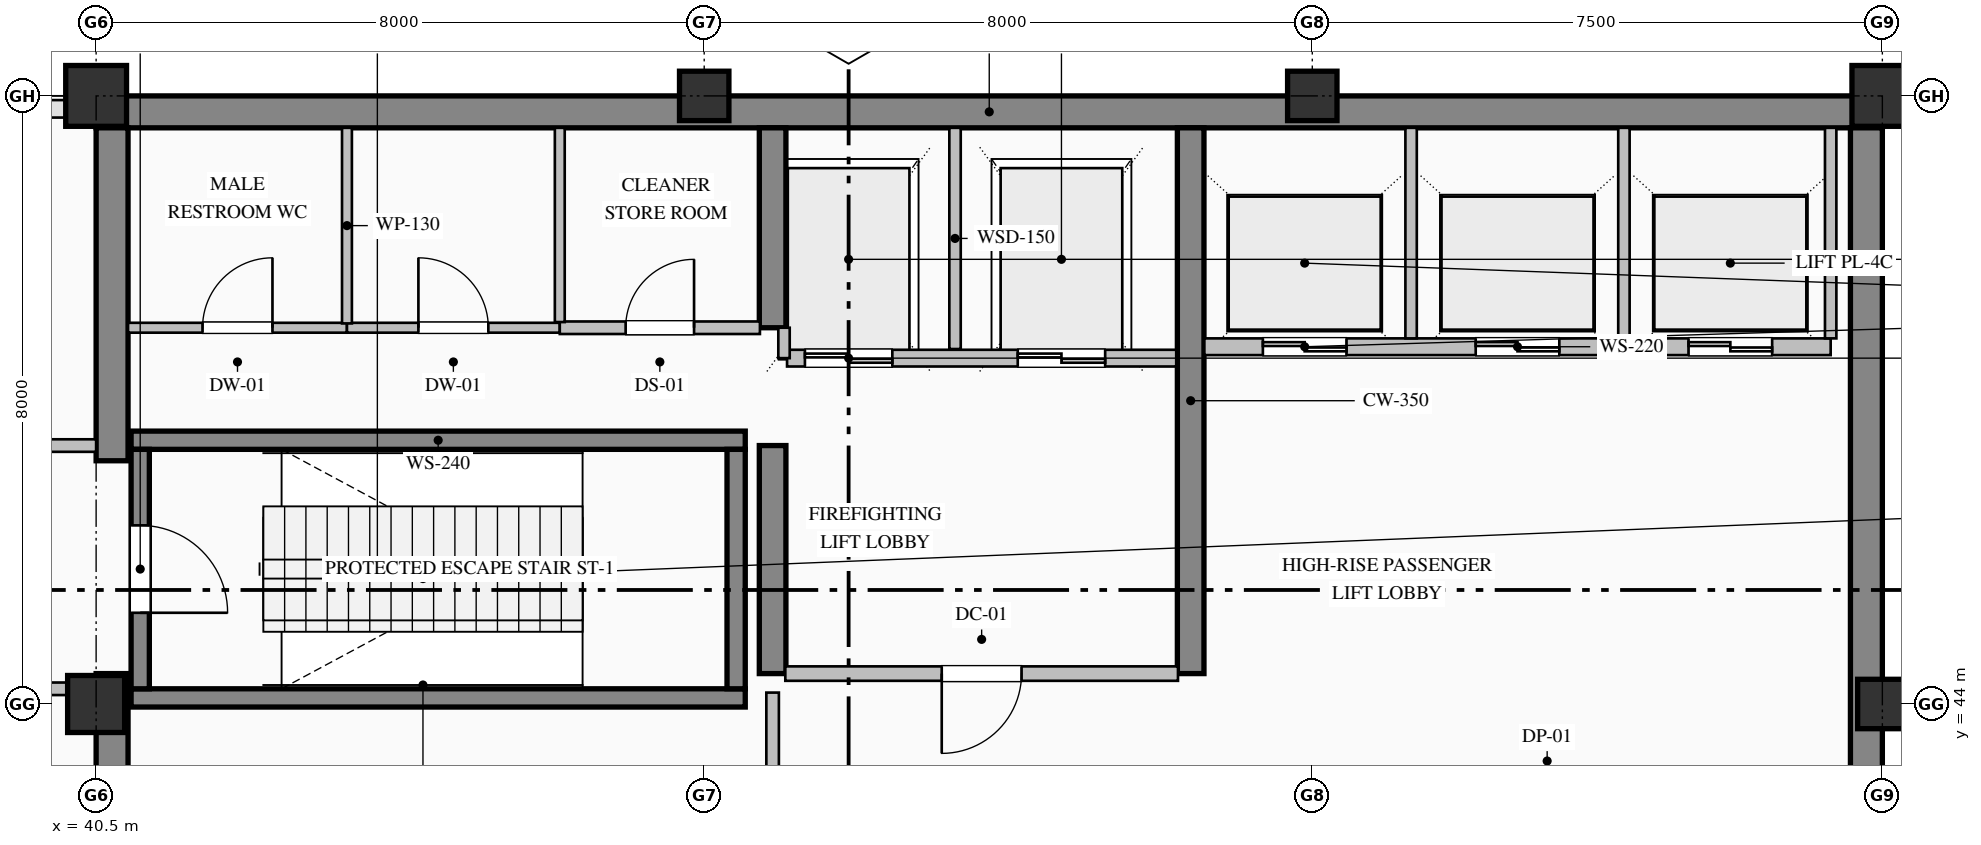
"""IFC4 building model, lengths in metres.
Left out: names, types, materials, properties, quantities, classifications, styles, units other than length and angle.
Written with IfcOpenShell. Run it as: python <this file> out.ifc"""

import sys

from ifc_helpers import new_model, si_unit, direction, frame, frame_2d, origin, origin_2d, place, context, subcontext, project, spatial, rectangle, hollow_rectangle, extrude, element, fill, save


model = new_model("IFC4")
c1 = context("Model", 3, precision=1e-05, world=origin(), true_north=direction((0.0, 1.0)))
c2 = subcontext(c1, "Body", "Model", "MODEL_VIEW")
j1 = project(units=[si_unit("LENGTHUNIT", "METRE"), si_unit("PLANEANGLEUNIT", "RADIAN")], contexts=[c1])
p1 = place(None, origin())
s1 = spatial("IfcSite", under=j1, at=p1, CompositionType="ELEMENT")
p2 = place(p1, origin())
s2 = spatial("IfcBuilding", under=s1, at=p2, CompositionType="ELEMENT")
p3 = place(p2, frame((0.0, 0.0, 367.2)))
s3 = spatial("IfcBuildingStorey", under=s2, at=p3, CompositionType="ELEMENT", Elevation=367.2)
p4 = place(p3, frame((40.5, 51.79, 0.0), z_axis=(0.0, 0.0, 1.0), x_axis=(1.0, 0.0, 0.0)))
e1 = element("IfcWall", 1, at=p4, inside=s3, PredefinedType="SHEAR", context=c2, shape_type="SweptSolid", body=[
    extrude(rectangle(XDim=23.5, YDim=0.42, at=frame_2d((11.75, 0.0))), origin(), (0.0, 0.0, 1.0), 5.39),
])
p5 = place(p3, frame((63.79, 36.32, 0.0), z_axis=(0.0, 0.0, 1.0), x_axis=(0.0, 1.0, 0.0)))
e2 = element("IfcWall", 2, at=p5, inside=s3, PredefinedType="SHEAR", context=c2, shape_type="SweptSolid", body=[
    extrude(rectangle(XDim=15.26, YDim=0.42, at=frame_2d((7.63, 0.0))), origin(), (0.0, 0.0, 1.0), 5.39),
])
p6 = place(p3, frame((40.71, 36.42, 0.0), z_axis=(0.0, 0.0, 1.0), x_axis=(0.0, 1.0, 0.0)))
e3 = element("IfcWall", 3, at=p6, inside=s3, PredefinedType="SHEAR", context=c2, shape_type="SweptSolid", body=[
    extrude(rectangle(XDim=7.98, YDim=0.42, at=frame_2d((3.99, 0.0))), origin(), (0.0, 0.0, 1.0), 5.39),
])
p7 = place(p3, frame((40.71, 47.2, 0.0), z_axis=(0.0, 0.0, 1.0), x_axis=(0.0, 1.0, 0.0)))
e4 = element("IfcWall", 4, at=p7, inside=s3, PredefinedType="SHEAR", context=c2, shape_type="SweptSolid", body=[
    extrude(rectangle(XDim=4.38, YDim=0.42, at=frame_2d((2.19, 0.0))), origin(), (0.0, 0.0, 1.0), 5.39),
])
p8 = place(p3, frame((49.4, 44.4, 0.0), z_axis=(0.0, 0.0, 1.0), x_axis=(0.0, 1.0, 0.0)))
e5 = element("IfcWall", 5, at=p8, inside=s3, PredefinedType="SHEAR", context=c2, shape_type="SweptSolid", body=[
    extrude(rectangle(XDim=3.0, YDim=0.35, at=frame_2d((1.5, 0.0))), origin(), (0.0, 0.0, 1.0), 5.39),
])
p9 = place(p3, frame((49.4, 48.95, 0.0), z_axis=(0.0, 0.0, 1.0), x_axis=(0.0, 1.0, 0.0)))
e6 = element("IfcWall", 6, at=p9, inside=s3, PredefinedType="SHEAR", context=c2, shape_type="SweptSolid", body=[
    extrude(rectangle(XDim=2.63, YDim=0.35, at=frame_2d((1.315, 0.0))), origin(), (0.0, 0.0, 1.0), 5.39),
])
p10 = place(p3, frame((54.9, 44.4, 0.0), z_axis=(0.0, 0.0, 1.0), x_axis=(0.0, 1.0, 0.0)))
e7 = element("IfcWall", 7, at=p10, inside=s3, PredefinedType="SHEAR", context=c2, shape_type="SweptSolid", body=[
    extrude(rectangle(XDim=7.18, YDim=0.35, at=frame_2d((3.59, 0.0))), origin(), (0.0, 0.0, 1.0), 5.39),
])
p11 = place(p3, frame((40.5, 44.0, 0.0), z_axis=(0.0, 0.0, 1.0), x_axis=(1.0, 0.0, 0.0)))
e8 = element("IfcColumn", 8, at=p11, inside=s3, PredefinedType="COLUMN", context=c2, shape_type="SweptSolid", body=[
    extrude(rectangle(XDim=0.75, YDim=0.75, at=origin_2d()), origin(), (0.0, 0.0, 1.0), 5.8),
])
p12 = place(p3, frame((40.5, 52.0, 0.0), z_axis=(0.0, 0.0, 1.0), x_axis=(1.0, 0.0, 0.0)))
e9 = element("IfcColumn", 9, at=p12, inside=s3, PredefinedType="COLUMN", context=c2, shape_type="SweptSolid", body=[
    extrude(hollow_rectangle(XDim=0.8, YDim=0.8, WallThickness=0.032, at=origin_2d()), origin(), (0.0, 0.0, 1.0), 5.8),
])
for number, where, z_axis, x_axis in (
    (10, (48.5, 52.0, 0.0), (0.0, 0.0, 1.0), (1.0, 0.0, 0.0)),
    (11, (56.5, 52.0, 0.0), (0.0, 0.0, 1.0), (1.0, 0.0, 0.0)),
    (12, (64.0, 44.0, 0.0), (0.0, 0.0, 1.0), (1.0, 0.0, 0.0)),
):
    element("IfcColumn", number, at=place(p3, frame(where, z_axis=z_axis, x_axis=x_axis)), inside=s3, PredefinedType="COLUMN", context=c2, shape_type="SweptSolid", body=[
        extrude(hollow_rectangle(XDim=0.65, YDim=0.65, WallThickness=0.028, at=origin_2d()), origin(), (0.0, 0.0, 1.0), 5.8),
    ])
p13 = place(p3, frame((64.0, 52.0, 0.0), z_axis=(0.0, 0.0, 1.0), x_axis=(1.0, 0.0, 0.0)))
e13 = element("IfcColumn", 13, at=p13, inside=s3, PredefinedType="COLUMN", context=c2, shape_type="SweptSolid", body=[
    extrude(hollow_rectangle(XDim=0.8, YDim=0.8, WallThickness=0.032, at=origin_2d()), origin(), (0.0, 0.0, 1.0), 5.8),
])
for number, where, z_axis, x_axis in (
    (14, (40.96, 47.47, 0.0), (0.0, 0.0, 1.0), (1.0, 0.0, 0.0)),
    (15, (49.04, 44.08, 0.0), (0.0, 0.0, 1.0), (-1.0, 0.0, 0.0)),
):
    element("IfcWall", number, at=place(p3, frame(where, z_axis=z_axis, x_axis=x_axis)), inside=s3, PredefinedType="SOLIDWALL", context=c2, shape_type="SweptSolid", body=[
        extrude(rectangle(XDim=8.08, YDim=0.24, at=frame_2d((4.04, 0.0))), origin(), (0.0, 0.0, 1.0), 5.8),
    ])
p14 = place(p3, frame((41.08, 47.35, 0.0), z_axis=(0.0, 0.0, 1.0), x_axis=(0.0, -1.0, 0.0)))
e16 = element("IfcWall", 16, at=p14, inside=s3, PredefinedType="SOLIDWALL", context=c2, shape_type="SweptSolid", body=[
    extrude(rectangle(XDim=3.15, YDim=0.24, at=frame_2d((1.575, 0.0))), origin(), (0.0, 0.0, 1.0), 5.8),
])
p15 = place(p14, frame((1.0, 0.0, 0.0)))
e17 = element("IfcOpeningElement", 17, at=p15, cuts=e16, PredefinedType="OPENING", context=c2, shape_type="SweptSolid", body=[
    extrude(rectangle(XDim=1.15, YDim=2.2, at=frame_2d((0.575, 1.1))), frame((0.0, 0.13, 0.0), z_axis=(0.0, -1.0, 0.0), x_axis=(1.0, 0.0, 0.0)), (0.0, 0.0, 1.0), 0.26),
])
p16 = place(p3, frame((48.92, 44.2, 0.0), z_axis=(0.0, 0.0, 1.0), x_axis=(0.0, 1.0, 0.0)))
e18 = element("IfcWall", 18, at=p16, inside=s3, PredefinedType="SOLIDWALL", context=c2, shape_type="SweptSolid", body=[
    extrude(rectangle(XDim=3.15, YDim=0.24, at=frame_2d((1.575, 0.0))), origin(), (0.0, 0.0, 1.0), 5.8),
])
p17 = place(p3, frame((54.71, 48.55, 0.0), z_axis=(0.0, 0.0, 1.0), x_axis=(-1.0, 0.0, 0.0)))
e19 = element("IfcWall", 19, at=p17, inside=s3, PredefinedType="PARTITIONING", context=c2, shape_type="SweptSolid", body=[
    extrude(rectangle(XDim=5.12, YDim=0.22, at=frame_2d((2.56, 0.0))), origin(), (0.0, 0.0, 1.0), 5.39),
])
p18 = place(p17, frame((3.735, 0.0, 0.0)))
e20 = element("IfcOpeningElement", 20, at=p18, cuts=e19, PredefinedType="OPENING", context=c2, shape_type="SweptSolid", body=[
    extrude(rectangle(XDim=1.15, YDim=2.2, at=frame_2d((0.575, 1.1))), frame((0.0, 0.12, 0.0), z_axis=(0.0, -1.0, 0.0), x_axis=(1.0, 0.0, 0.0)), (0.0, 0.0, 1.0), 0.24),
])
p19 = place(p17, frame((0.935, 0.0, 0.0)))
e21 = element("IfcOpeningElement", 21, at=p19, cuts=e19, PredefinedType="OPENING", context=c2, shape_type="SweptSolid", body=[
    extrude(rectangle(XDim=1.15, YDim=2.2, at=frame_2d((0.575, 1.1))), frame((0.0, 0.12, 0.0), z_axis=(0.0, -1.0, 0.0), x_axis=(1.0, 0.0, 0.0)), (0.0, 0.0, 1.0), 0.24),
])
p20 = place(p3, frame((51.8, 48.67, 0.0), z_axis=(0.0, 0.0, 1.0), x_axis=(0.0, 1.0, 0.0)))
e22 = element("IfcWall", 22, at=p20, inside=s3, PredefinedType="PARTITIONING", context=c2, shape_type="SweptSolid", body=[
    extrude(rectangle(XDim=2.91, YDim=0.15, at=frame_2d((1.455, 0.0))), origin(), (0.0, 0.0, 1.0), 5.39),
])
p21 = place(p3, frame((49.55, 48.55, 0.0), z_axis=(0.0, 0.0, 1.0), x_axis=(0.0, 1.0, 0.0)))
e23 = element("IfcWall", 23, at=p21, inside=s3, PredefinedType="PARTITIONING", context=c2, shape_type="SweptSolid", body=[
    extrude(rectangle(XDim=0.4, YDim=0.15, at=frame_2d((0.2, 0.0))), origin(), (0.0, 0.0, 1.0), 5.39),
])
p22 = place(p3, frame((63.32, 48.7, 0.0), z_axis=(0.0, 0.0, 1.0), x_axis=(-1.0, 0.0, 0.0)))
e24 = element("IfcWall", 24, at=p22, inside=s3, PredefinedType="PARTITIONING", context=c2, shape_type="SweptSolid", body=[
    extrude(rectangle(XDim=8.24, YDim=0.22, at=frame_2d((4.12, 0.0))), origin(), (0.0, 0.0, 1.0), 5.39),
])
p23 = place(p22, frame((6.37, 0.0, 0.0)))
e25 = element("IfcOpeningElement", 25, at=p23, cuts=e24, PredefinedType="OPENING", context=c2, shape_type="SweptSolid", body=[
    extrude(rectangle(XDim=1.1, YDim=2.2, at=frame_2d((0.55, 1.1))), frame((0.0, 0.12, 0.0), z_axis=(0.0, -1.0, 0.0), x_axis=(1.0, 0.0, 0.0)), (0.0, 0.0, 1.0), 0.24),
])
p24 = place(p22, frame((3.57, 0.0, 0.0)))
e26 = element("IfcOpeningElement", 26, at=p24, cuts=e24, PredefinedType="OPENING", context=c2, shape_type="SweptSolid", body=[
    extrude(rectangle(XDim=1.1, YDim=2.2, at=frame_2d((0.55, 1.1))), frame((0.0, 0.12, 0.0), z_axis=(0.0, -1.0, 0.0), x_axis=(1.0, 0.0, 0.0)), (0.0, 0.0, 1.0), 0.24),
])
p25 = place(p22, frame((0.77, 0.0, 0.0)))
e27 = element("IfcOpeningElement", 27, at=p25, cuts=e24, PredefinedType="OPENING", context=c2, shape_type="SweptSolid", body=[
    extrude(rectangle(XDim=1.1, YDim=2.2, at=frame_2d((0.55, 1.1))), frame((0.0, 0.12, 0.0), z_axis=(0.0, -1.0, 0.0), x_axis=(1.0, 0.0, 0.0)), (0.0, 0.0, 1.0), 0.24),
])
for number, where, z_axis, x_axis in (
    (28, (57.8, 48.81, 0.0), (0.0, 0.0, 1.0), (0.0, 1.0, 0.0)),
    (29, (60.6, 48.81, 0.0), (0.0, 0.0, 1.0), (0.0, 1.0, 0.0)),
    (30, (63.32, 48.81, 0.0), (0.0, 0.0, 1.0), (0.0, 1.0, 0.0)),
):
    element("IfcWall", number, at=place(p3, frame(where, z_axis=z_axis, x_axis=x_axis)), inside=s3, PredefinedType="PARTITIONING", context=c2, shape_type="SweptSolid", body=[
        extrude(rectangle(XDim=2.77, YDim=0.15, at=frame_2d((1.385, 0.0))), origin(), (0.0, 0.0, 1.0), 5.39),
    ])
p26 = place(p3, frame((37.8, 47.4, 0.0), z_axis=(0.0, 0.0, 1.0), x_axis=(1.0, 0.0, 0.0)))
e31 = element("IfcWall", 31, at=p26, inside=s3, PredefinedType="PARTITIONING", context=c2, shape_type="SweptSolid", body=[
    extrude(rectangle(XDim=2.7, YDim=0.165, at=frame_2d((1.35, 0.0))), origin(), (0.0, 0.0, 1.0), 5.39),
])
p27 = place(p26, frame((0.825, 0.0, 0.0)))
e32 = element("IfcOpeningElement", 32, at=p27, cuts=e31, PredefinedType="OPENING", context=c2, shape_type="SweptSolid", body=[
    extrude(rectangle(XDim=1.05, YDim=2.15, at=frame_2d((0.525, 1.075))), frame((0.0, 0.093, 0.0), z_axis=(0.0, -1.0, 0.0), x_axis=(1.0, 0.0, 0.0)), (0.0, 0.0, 1.0), 0.185),
])
p28 = place(p3, frame((40.5, 44.2, 0.0), z_axis=(0.0, 0.0, 1.0), x_axis=(-1.0, 0.0, 0.0)))
e33 = element("IfcWall", 33, at=p28, inside=s3, PredefinedType="PARTITIONING", context=c2, shape_type="SweptSolid", body=[
    extrude(rectangle(XDim=2.3, YDim=0.165, at=frame_2d((1.15, 0.0))), origin(), (0.0, 0.0, 1.0), 5.39),
])
p29 = place(p28, frame((0.625, 0.0, 0.0)))
e34 = element("IfcOpeningElement", 34, at=p29, cuts=e33, PredefinedType="OPENING", context=c2, shape_type="SweptSolid", body=[
    extrude(rectangle(XDim=1.05, YDim=2.15, at=frame_2d((0.525, 1.075))), frame((0.0, 0.093, 0.0), z_axis=(0.0, -1.0, 0.0), x_axis=(1.0, 0.0, 0.0)), (0.0, 0.0, 1.0), 0.185),
])
p30 = place(p3, frame((40.92, 48.95, 0.0), z_axis=(0.0, 0.0, 1.0), x_axis=(1.0, 0.0, 0.0)))
e35 = element("IfcWall", 35, at=p30, inside=s3, PredefinedType="PARTITIONING", context=c2, shape_type="SweptSolid", body=[
    extrude(rectangle(XDim=2.88, YDim=0.13, at=frame_2d((1.44, 0.0))), origin(), (0.0, 0.0, 1.0), 5.39),
])
p31 = place(p30, frame((0.98, 0.0, 0.0)))
e36 = element("IfcOpeningElement", 36, at=p31, cuts=e35, PredefinedType="OPENING", context=c2, shape_type="SweptSolid", body=[
    extrude(rectangle(XDim=0.92, YDim=2.15, at=frame_2d((0.46, 1.075))), frame((0.0, 0.075, 0.0), z_axis=(0.0, -1.0, 0.0), x_axis=(1.0, 0.0, 0.0)), (0.0, 0.0, 1.0), 0.15),
])
p32 = place(p3, frame((43.8, 48.95, 0.0), z_axis=(0.0, 0.0, 1.0), x_axis=(1.0, 0.0, 0.0)))
e37 = element("IfcWall", 37, at=p32, inside=s3, PredefinedType="PARTITIONING", context=c2, shape_type="SweptSolid", body=[
    extrude(rectangle(XDim=2.8, YDim=0.13, at=frame_2d((1.4, 0.0))), origin(), (0.0, 0.0, 1.0), 5.39),
])
p33 = place(p32, frame((0.94, 0.0, 0.0)))
e38 = element("IfcOpeningElement", 38, at=p33, cuts=e37, PredefinedType="OPENING", context=c2, shape_type="SweptSolid", body=[
    extrude(rectangle(XDim=0.92, YDim=2.15, at=frame_2d((0.46, 1.075))), frame((0.0, 0.075, 0.0), z_axis=(0.0, -1.0, 0.0), x_axis=(1.0, 0.0, 0.0)), (0.0, 0.0, 1.0), 0.15),
])
p34 = place(p3, frame((46.6, 48.95, 0.0), z_axis=(0.0, 0.0, 1.0), x_axis=(1.0, 0.0, 0.0)))
e39 = element("IfcWall", 39, at=p34, inside=s3, PredefinedType="PARTITIONING", context=c2, shape_type="SweptSolid", body=[
    extrude(rectangle(XDim=2.633, YDim=0.165, at=frame_2d((1.316, 0.0))), origin(), (0.0, 0.0, 1.0), 5.39),
])
p35 = place(p34, frame((0.866, 0.0, 0.0)))
e40 = element("IfcOpeningElement", 40, at=p35, cuts=e39, PredefinedType="OPENING", context=c2, shape_type="SweptSolid", body=[
    extrude(rectangle(XDim=0.9, YDim=2.15, at=frame_2d((0.45, 1.075))), frame((0.0, 0.093, 0.0), z_axis=(0.0, -1.0, 0.0), x_axis=(1.0, 0.0, 0.0)), (0.0, 0.0, 1.0), 0.185),
])
p36 = place(p3, frame((54.733, 44.4, 0.0), z_axis=(0.0, 0.0, 1.0), x_axis=(-1.0, 0.0, 0.0)))
e41 = element("IfcWall", 41, at=p36, inside=s3, PredefinedType="PARTITIONING", context=c2, shape_type="SweptSolid", body=[
    extrude(rectangle(XDim=5.166, YDim=0.19, at=frame_2d((2.583, 0.0))), origin(), (0.0, 0.0, 1.0), 5.39),
])
p37 = place(p36, frame((2.058, 0.0, 0.0)))
e42 = element("IfcOpeningElement", 42, at=p37, cuts=e41, PredefinedType="OPENING", context=c2, shape_type="SweptSolid", body=[
    extrude(rectangle(XDim=1.05, YDim=2.15, at=frame_2d((0.525, 1.075))), frame((0.0, 0.105, 0.0), z_axis=(0.0, -1.0, 0.0), x_axis=(1.0, 0.0, 0.0)), (0.0, 0.0, 1.0), 0.21),
])
p38 = place(p3, frame((49.4, 39.647, 0.0), z_axis=(0.0, 0.0, 1.0), x_axis=(0.0, 1.0, 0.0)))
e43 = element("IfcWall", 43, at=p38, inside=s3, PredefinedType="PARTITIONING", context=c2, shape_type="SweptSolid", body=[
    extrude(rectangle(XDim=4.503, YDim=0.165, at=frame_2d((2.251, 0.0))), origin(), (0.0, 0.0, 1.0), 4.632),
])
p39 = place(p38, frame((1.802, 0.0, 0.0)))
e44 = element("IfcOpeningElement", 44, at=p39, cuts=e43, PredefinedType="OPENING", context=c2, shape_type="SweptSolid", body=[
    extrude(rectangle(XDim=0.9, YDim=2.15, at=frame_2d((0.45, 1.075))), frame((0.0, 0.093, 0.0), z_axis=(0.0, -1.0, 0.0), x_axis=(1.0, 0.0, 0.0)), (0.0, 0.0, 1.0), 0.185),
])
p40 = place(p3, frame((43.8, 51.58, 0.0), z_axis=(0.0, 0.0, 1.0), x_axis=(0.0, -1.0, 0.0)))
e45 = element("IfcWall", 45, at=p40, inside=s3, PredefinedType="PARTITIONING", context=c2, shape_type="SweptSolid", body=[
    extrude(rectangle(XDim=2.573, YDim=0.13, at=frame_2d((1.287, 0.0))), origin(), (0.0, 0.0, 1.0), 5.39),
])
p41 = place(p3, frame((46.6, 51.58, 0.0), z_axis=(0.0, 0.0, 1.0), x_axis=(0.0, -1.0, 0.0)))
e46 = element("IfcWall", 46, at=p41, inside=s3, PredefinedType="PARTITIONING", context=c2, shape_type="SweptSolid", body=[
    extrude(rectangle(XDim=2.556, YDim=0.13, at=frame_2d((1.278, 0.0))), origin(), (0.0, 0.0, 1.0), 5.39),
])
p42 = place(p15, origin())
e47 = element("IfcDoor", 47, at=p42, inside=s3, OperationType="SINGLE_SWING_RIGHT", PredefinedType="DOOR", context=c2, shape_type="SweptSolid", body=[
    extrude(rectangle(XDim=1.15, YDim=2.2, at=frame_2d((0.575, 1.1))), frame((0.0, 0.025, 0.0), z_axis=(0.0, -1.0, 0.0), x_axis=(1.0, 0.0, 0.0)), (0.0, 0.0, 1.0), 0.05),
])
fill(e17, e47)
p43 = place(p18, origin())
e48 = element("IfcDoor", 48, at=p43, inside=s3, OperationType="DOUBLE_DOOR_SLIDING", PredefinedType="DOOR", context=c2, shape_type="SweptSolid", body=[
    extrude(rectangle(XDim=1.15, YDim=2.2, at=frame_2d((0.575, 1.1))), frame((0.0, 0.025, 0.0), z_axis=(0.0, -1.0, 0.0), x_axis=(1.0, 0.0, 0.0)), (0.0, 0.0, 1.0), 0.05),
])
fill(e20, e48)
p44 = place(p19, origin())
e49 = element("IfcDoor", 49, at=p44, inside=s3, OperationType="DOUBLE_DOOR_SLIDING", PredefinedType="DOOR", context=c2, shape_type="SweptSolid", body=[
    extrude(rectangle(XDim=1.15, YDim=2.2, at=frame_2d((0.575, 1.1))), frame((0.0, 0.025, 0.0), z_axis=(0.0, -1.0, 0.0), x_axis=(1.0, 0.0, 0.0)), (0.0, 0.0, 1.0), 0.05),
])
fill(e21, e49)
p45 = place(p23, origin())
e50 = element("IfcDoor", 50, at=p45, inside=s3, OperationType="DOUBLE_DOOR_SLIDING", PredefinedType="DOOR", context=c2, shape_type="SweptSolid", body=[
    extrude(rectangle(XDim=1.1, YDim=2.2, at=frame_2d((0.55, 1.1))), frame((0.0, 0.025, 0.0), z_axis=(0.0, -1.0, 0.0), x_axis=(1.0, 0.0, 0.0)), (0.0, 0.0, 1.0), 0.05),
])
fill(e25, e50)
p46 = place(p24, origin())
e51 = element("IfcDoor", 51, at=p46, inside=s3, OperationType="DOUBLE_DOOR_SLIDING", PredefinedType="DOOR", context=c2, shape_type="SweptSolid", body=[
    extrude(rectangle(XDim=1.1, YDim=2.2, at=frame_2d((0.55, 1.1))), frame((0.0, 0.025, 0.0), z_axis=(0.0, -1.0, 0.0), x_axis=(1.0, 0.0, 0.0)), (0.0, 0.0, 1.0), 0.05),
])
fill(e26, e51)
p47 = place(p25, origin())
e52 = element("IfcDoor", 52, at=p47, inside=s3, OperationType="DOUBLE_DOOR_SLIDING", PredefinedType="DOOR", context=c2, shape_type="SweptSolid", body=[
    extrude(rectangle(XDim=1.1, YDim=2.2, at=frame_2d((0.55, 1.1))), frame((0.0, 0.025, 0.0), z_axis=(0.0, -1.0, 0.0), x_axis=(1.0, 0.0, 0.0)), (0.0, 0.0, 1.0), 0.05),
])
fill(e27, e52)
p48 = place(p37, origin())
e53 = element("IfcDoor", 53, at=p48, inside=s3, OperationType="SINGLE_SWING_RIGHT", PredefinedType="DOOR", context=c2, shape_type="SweptSolid", body=[
    extrude(rectangle(XDim=1.05, YDim=2.15, at=frame_2d((0.525, 1.075))), frame((0.0, 0.025, 0.0), z_axis=(0.0, -1.0, 0.0), x_axis=(1.0, 0.0, 0.0)), (0.0, 0.0, 1.0), 0.05),
])
fill(e42, e53)
p49 = place(p31, origin())
e54 = element("IfcDoor", 54, at=p49, inside=s3, OperationType="SINGLE_SWING_RIGHT", PredefinedType="DOOR", context=c2, shape_type="SweptSolid", body=[
    extrude(rectangle(XDim=0.92, YDim=2.15, at=frame_2d((0.46, 1.075))), frame((0.0, 0.025, 0.0), z_axis=(0.0, -1.0, 0.0), x_axis=(1.0, 0.0, 0.0)), (0.0, 0.0, 1.0), 0.05),
])
fill(e36, e54)
p50 = place(p33, origin())
e55 = element("IfcDoor", 55, at=p50, inside=s3, OperationType="SINGLE_SWING_LEFT", PredefinedType="DOOR", context=c2, shape_type="SweptSolid", body=[
    extrude(rectangle(XDim=0.92, YDim=2.15, at=frame_2d((0.46, 1.075))), frame((0.0, 0.025, 0.0), z_axis=(0.0, -1.0, 0.0), x_axis=(1.0, 0.0, 0.0)), (0.0, 0.0, 1.0), 0.05),
])
fill(e38, e55)
p51 = place(p35, origin())
e56 = element("IfcDoor", 56, at=p51, inside=s3, OperationType="SINGLE_SWING_RIGHT", PredefinedType="DOOR", context=c2, shape_type="SweptSolid", body=[
    extrude(rectangle(XDim=0.9, YDim=2.15, at=frame_2d((0.45, 1.075))), frame((0.0, 0.025, 0.0), z_axis=(0.0, -1.0, 0.0), x_axis=(1.0, 0.0, 0.0)), (0.0, 0.0, 1.0), 0.05),
])
fill(e40, e56)
save(model, sys.argv[1])
